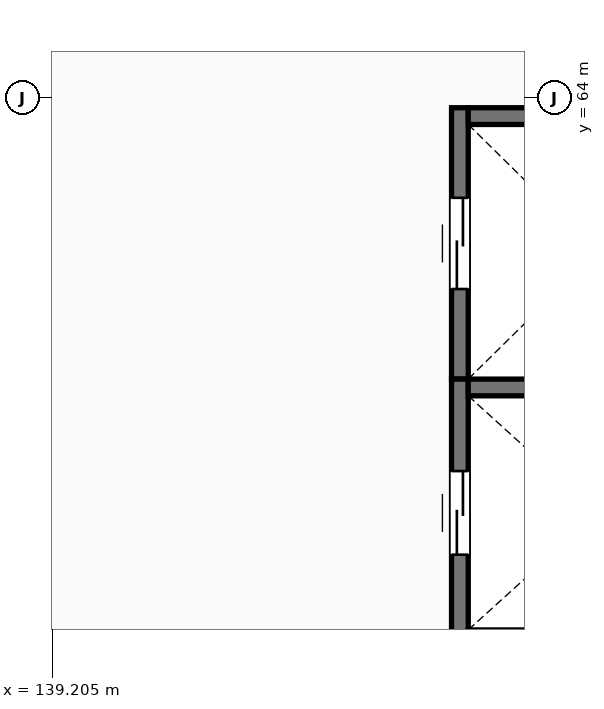
"""IFC4 building model, lengths in metres.
Left out: names, types, materials, properties, quantities, classifications, styles, units other than length and angle.
Written with IfcOpenShell. Run it as: python <this file> out.ifc"""

import sys

from ifc_helpers import new_model, si_unit, direction, frame, frame_2d, origin, place, context, subcontext, project, spatial, rectangle, extrude, element, fill, save


model = new_model("IFC4")
c1 = context("Model", 3, precision=1e-05, world=origin(), true_north=direction((0.0, 1.0)))
c2 = subcontext(c1, "Body", "Model", "MODEL_VIEW")
j1 = project(units=[si_unit("LENGTHUNIT", "METRE"), si_unit("PLANEANGLEUNIT", "RADIAN")], contexts=[c1])
p1 = place(None, origin())
s1 = spatial("IfcSite", under=j1, at=p1, CompositionType="ELEMENT")
p2 = place(p1, origin())
s2 = spatial("IfcBuilding", under=s1, at=p2, CompositionType="ELEMENT")
p3 = place(p2, frame((0.0, 0.0, 4.5)))
s3 = spatial("IfcBuildingStorey", under=s2, at=p3, CompositionType="ELEMENT", Elevation=4.5)
p4 = place(p3, frame((144.57, 60.3, 0.0), z_axis=(0.0, 0.0, 1.0), x_axis=(0.0, 1.0, 0.0)))
e1 = element("IfcWall", 1, at=p4, inside=s3, PredefinedType="SHEAR", context=c2, shape_type="SweptSolid", body=[
    extrude(rectangle(XDim=3.57, YDim=0.22, at=frame_2d((1.785, 0.0))), origin(), (0.0, 0.0, 1.0), 3.9),
])
p5 = place(p4, frame((1.185, 0.0, 0.0)))
e2 = element("IfcOpeningElement", 2, at=p5, cuts=e1, PredefinedType="OPENING", context=c2, shape_type="SweptSolid", body=[
    extrude(rectangle(XDim=1.2, YDim=2.2, at=frame_2d((0.6, 1.1))), frame((0.0, 0.12, 0.0), z_axis=(0.0, -1.0, 0.0), x_axis=(1.0, 0.0, 0.0)), (0.0, 0.0, 1.0), 0.24),
])
p6 = place(p3, frame((144.68, 63.76, 0.0), z_axis=(0.0, 0.0, 1.0), x_axis=(1.0, 0.0, 0.0)))
e3 = element("IfcWall", 3, at=p6, inside=s3, PredefinedType="SHEAR", context=c2, shape_type="SweptSolid", body=[
    extrude(rectangle(XDim=3.4, YDim=0.22, at=frame_2d((1.7, 0.0))), origin(), (0.0, 0.0, 1.0), 3.9),
])
p7 = place(p3, frame((144.57, 56.78, 0.0), z_axis=(0.0, 0.0, 1.0), x_axis=(0.0, 1.0, 0.0)))
e4 = element("IfcWall", 4, at=p7, inside=s3, PredefinedType="SHEAR", context=c2, shape_type="SweptSolid", body=[
    extrude(rectangle(XDim=3.52, YDim=0.22, at=frame_2d((1.76, 0.0))), origin(), (0.0, 0.0, 1.0), 3.9),
])
p8 = place(p7, frame((1.21, 0.0, 0.0)))
e5 = element("IfcOpeningElement", 5, at=p8, cuts=e4, PredefinedType="OPENING", context=c2, shape_type="SweptSolid", body=[
    extrude(rectangle(XDim=1.1, YDim=2.2, at=frame_2d((0.55, 1.1))), frame((0.0, 0.12, 0.0), z_axis=(0.0, -1.0, 0.0), x_axis=(1.0, 0.0, 0.0)), (0.0, 0.0, 1.0), 0.24),
])
p9 = place(p3, frame((144.68, 60.19, 0.0), z_axis=(0.0, 0.0, 1.0), x_axis=(1.0, 0.0, 0.0)))
e6 = element("IfcWall", 6, at=p9, inside=s3, PredefinedType="SHEAR", context=c2, shape_type="SweptSolid", body=[
    extrude(rectangle(XDim=3.4, YDim=0.22, at=frame_2d((1.7, 0.0))), origin(), (0.0, 0.0, 1.0), 3.9),
])
p10 = place(p5, origin())
e7 = element("IfcDoor", 7, at=p10, inside=s3, OperationType="DOUBLE_DOOR_SLIDING", PredefinedType="DOOR", context=c2, shape_type="SweptSolid", body=[
    extrude(rectangle(XDim=1.2, YDim=2.2, at=frame_2d((0.6, 1.1))), frame((0.0, 0.025, 0.0), z_axis=(0.0, -1.0, 0.0), x_axis=(1.0, 0.0, 0.0)), (0.0, 0.0, 1.0), 0.05),
])
fill(e2, e7)
p11 = place(p8, origin())
e8 = element("IfcDoor", 8, at=p11, inside=s3, OperationType="DOUBLE_DOOR_SLIDING", PredefinedType="DOOR", context=c2, shape_type="SweptSolid", body=[
    extrude(rectangle(XDim=1.1, YDim=2.2, at=frame_2d((0.55, 1.1))), frame((0.0, 0.025, 0.0), z_axis=(0.0, -1.0, 0.0), x_axis=(1.0, 0.0, 0.0)), (0.0, 0.0, 1.0), 0.05),
])
fill(e5, e8)
save(model, sys.argv[1])
